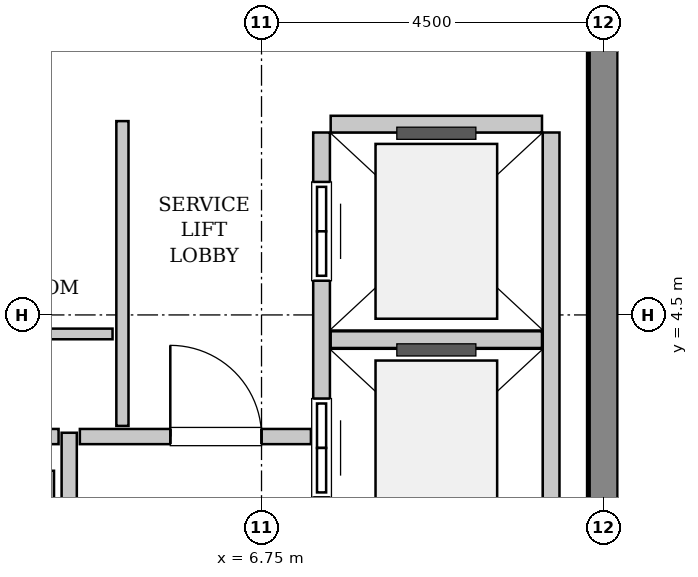
"""IFC4 building model, lengths in metres.
Left out: names, types, materials, properties, quantities, classifications, styles, units other than length and angle.
Written with IfcOpenShell. Run it as: python <this file> out.ifc"""

import sys

from ifc_helpers import new_model, si_unit, direction, frame, frame_2d, origin, place, context, subcontext, project, spatial, rectangle, extrude, source, transform, mapped, element, fill, save


model = new_model("IFC4")
c1 = context("Model", 3, precision=1e-05, world=origin(), true_north=direction((0.0, 1.0)))
c2 = subcontext(c1, "Body", "Model", "MODEL_VIEW")
j1 = project(units=[si_unit("LENGTHUNIT", "METRE"), si_unit("PLANEANGLEUNIT", "RADIAN")], contexts=[c1])
p1 = place(None, origin())
s1 = spatial("IfcSite", under=j1, at=p1, CompositionType="ELEMENT")
p2 = place(p1, origin())
s2 = spatial("IfcBuilding", under=s1, at=p2, CompositionType="ELEMENT")
p3 = place(p2, frame((0.0, 0.0, 358.6)))
s3 = spatial("IfcBuildingStorey", under=s2, at=p3, CompositionType="ELEMENT", Elevation=358.6)
m1 = source(origin(), c2, "Body", "SweptSolid", [
    extrude(rectangle(XDim=7.45, YDim=0.4, at=frame_2d((3.725, 0.0))), origin(), (0.0, 0.0, 1.0), 4.4),
])
p4 = place(p3, frame((11.25, 1.35, 0.0), z_axis=(0.0, 0.0, 1.0), x_axis=(0.0, 1.0, 0.0)))
e1 = element("IfcWall", 1, at=p4, inside=s3, PredefinedType="SHEAR", context=c2, shape_type="MappedRepresentation", body=[
    mapped(m1, transform((0.0, 0.0, 0.0), x_axis=(1.0, 0.0, 0.0), y_axis=(0.0, 1.0, 0.0), z_axis=(0.0, 0.0, 1.0), scale=1.0)),
])
m2 = source(origin(), c2, "Body", "SweptSolid", [
    extrude(rectangle(XDim=5.45, YDim=0.22, at=frame_2d((2.725, 0.0))), origin(), (0.0, 0.0, 1.0), 4.085),
])
p5 = place(p3, frame((7.54, 6.9, 0.0), z_axis=(0.0, 0.0, 1.0), x_axis=(0.0, -1.0, 0.0)))
e2 = element("IfcWall", 2, at=p5, inside=s3, PredefinedType="SOLIDWALL", context=c2, shape_type="MappedRepresentation", body=[
    mapped(m2, transform((0.0, 0.0, 0.0), x_axis=(1.0, 0.0, 0.0), y_axis=(0.0, 1.0, 0.0), z_axis=(0.0, 0.0, 1.0), scale=1.0)),
])
p6 = place(p5, frame((3.5, 0.0, 0.0)))
e3 = element("IfcOpeningElement", 3, at=p6, cuts=e2, PredefinedType="OPENING", context=c2, shape_type="SweptSolid", body=[
    extrude(rectangle(XDim=1.3, YDim=2.3, at=frame_2d((0.65, 1.15))), frame((0.0, 0.12, 0.0), z_axis=(0.0, -1.0, 0.0), x_axis=(1.0, 0.0, 0.0)), (0.0, 0.0, 1.0), 0.24),
])
p7 = place(p5, frame((0.65, 0.0, 0.0)))
e4 = element("IfcOpeningElement", 4, at=p7, cuts=e2, PredefinedType="OPENING", context=c2, shape_type="SweptSolid", body=[
    extrude(rectangle(XDim=1.3, YDim=2.3, at=frame_2d((0.65, 1.15))), frame((0.0, 0.12, 0.0), z_axis=(0.0, -1.0, 0.0), x_axis=(1.0, 0.0, 0.0)), (0.0, 0.0, 1.0), 0.24),
])
p8 = place(p3, frame((10.56, 1.45, 0.0), z_axis=(0.0, 0.0, 1.0), x_axis=(0.0, 1.0, 0.0)))
e5 = element("IfcWall", 5, at=p8, inside=s3, PredefinedType="SOLIDWALL", context=c2, shape_type="MappedRepresentation", body=[
    mapped(m2, transform((0.0, 0.0, 0.0), x_axis=(1.0, 0.0, 0.0), y_axis=(0.0, 1.0, 0.0), z_axis=(0.0, 0.0, 1.0), scale=1.0)),
])
m3 = source(origin(), c2, "Body", "SweptSolid", [
    extrude(rectangle(XDim=2.78, YDim=0.22, at=frame_2d((1.39, 0.0))), origin(), (0.0, 0.0, 1.0), 4.085),
])
for number, where, z_axis, x_axis in (
    (6, (7.66, 4.175, 0.0), (0.0, 0.0, 1.0), (1.0, 0.0, 0.0)),
    (7, (10.44, 7.01, 0.0), (0.0, 0.0, 1.0), (-1.0, 0.0, 0.0)),
):
    element("IfcWall", number, at=place(p3, frame(where, z_axis=z_axis, x_axis=x_axis)), inside=s3, PredefinedType="SOLIDWALL", context=c2, shape_type="MappedRepresentation", body=[
        mapped(m3, transform((0.0, 0.0, 0.0), x_axis=(1.0, 0.0, 0.0), y_axis=(0.0, 1.0, 0.0), z_axis=(0.0, 0.0, 1.0), scale=1.0)),
    ])
m4 = source(origin(), c2, "Body", "SweptSolid", [
    extrude(rectangle(XDim=4.9, YDim=0.22, at=frame_2d((2.45, 0.0))), origin(), (0.0, 0.0, 1.0), 4.085),
])
p9 = place(p3, frame((3.91, -2.45, 0.0), z_axis=(0.0, 0.0, 1.0), x_axis=(0.0, 1.0, 0.0)))
e8 = element("IfcWall", 8, at=p9, inside=s3, PredefinedType="SOLIDWALL", context=c2, shape_type="MappedRepresentation", body=[
    mapped(m4, transform((0.0, 0.0, 0.0), x_axis=(1.0, 0.0, 0.0), y_axis=(0.0, 1.0, 0.0), z_axis=(0.0, 0.0, 1.0), scale=1.0)),
])
m5 = source(origin(), c2, "Body", "SweptSolid", [
    extrude(rectangle(XDim=5.9, YDim=0.2, at=frame_2d((2.95, 0.0))), origin(), (0.0, 0.0, 1.0), 4.085),
])
p10 = place(p3, frame((4.22, -2.95, 0.0), z_axis=(0.0, 0.0, 1.0), x_axis=(0.0, 1.0, 0.0)))
e9 = element("IfcWall", 9, at=p10, inside=s3, PredefinedType="PARTITIONING", context=c2, shape_type="MappedRepresentation", body=[
    mapped(m5, transform((0.0, 0.0, 0.0), x_axis=(1.0, 0.0, 0.0), y_axis=(0.0, 1.0, 0.0), z_axis=(0.0, 0.0, 1.0), scale=1.0)),
])
m6 = source(origin(), c2, "Body", "SweptSolid", [
    extrude(rectangle(XDim=2.52, YDim=0.2, at=frame_2d((1.26, 0.0))), origin(), (0.0, 0.0, 1.0), 4.085),
])
p11 = place(p3, frame((1.56, 2.9, 0.0), z_axis=(0.0, 0.0, 1.0), x_axis=(1.0, 0.0, 0.0)))
e10 = element("IfcWall", 10, at=p11, inside=s3, PredefinedType="PARTITIONING", context=c2, shape_type="MappedRepresentation", body=[
    mapped(m6, transform((0.0, 0.0, 0.0), x_axis=(1.0, 0.0, 0.0), y_axis=(0.0, 1.0, 0.0), z_axis=(0.0, 0.0, 1.0), scale=1.0)),
])
m7 = source(origin(), c2, "Body", "SweptSolid", [
    extrude(rectangle(XDim=3.04, YDim=0.2, at=frame_2d((1.52, 0.0))), origin(), (0.0, 0.0, 1.0), 4.085),
])
p12 = place(p3, frame((4.36, 2.9, 0.0), z_axis=(0.0, 0.0, 1.0), x_axis=(1.0, 0.0, 0.0)))
e11 = element("IfcWall", 11, at=p12, inside=s3, PredefinedType="PARTITIONING", context=c2, shape_type="MappedRepresentation", body=[
    mapped(m7, transform((0.0, 0.0, 0.0), x_axis=(1.0, 0.0, 0.0), y_axis=(0.0, 1.0, 0.0), z_axis=(0.0, 0.0, 1.0), scale=1.0)),
])
p13 = place(p12, frame((1.19, 0.0, 0.0)))
e12 = element("IfcOpeningElement", 12, at=p13, cuts=e11, PredefinedType="OPENING", context=c2, shape_type="SweptSolid", body=[
    extrude(rectangle(XDim=1.2, YDim=2.15, at=frame_2d((0.6, 1.075))), frame((0.0, 0.11, 0.0), z_axis=(0.0, -1.0, 0.0), x_axis=(1.0, 0.0, 0.0)), (0.0, 0.0, 1.0), 0.22),
])
m8 = source(origin(), c2, "Body", "SweptSolid", [
    extrude(rectangle(XDim=4.01, YDim=0.16, at=frame_2d((2.005, 0.0))), origin(), (0.0, 0.0, 1.0), 4.085),
])
p14 = place(p3, frame((4.92, 3.04, 0.0), z_axis=(0.0, 0.0, 1.0), x_axis=(0.0, 1.0, 0.0)))
e13 = element("IfcWall", 13, at=p14, inside=s3, PredefinedType="PARTITIONING", context=c2, shape_type="MappedRepresentation", body=[
    mapped(m8, transform((0.0, 0.0, 0.0), x_axis=(1.0, 0.0, 0.0), y_axis=(0.0, 1.0, 0.0), z_axis=(0.0, 0.0, 1.0), scale=1.0)),
])
m9 = source(origin(), c2, "Body", "SweptSolid", [
    extrude(rectangle(XDim=3.15, YDim=0.14, at=frame_2d((1.575, 0.0))), origin(), (0.0, 0.0, 1.0), 4.085),
])
p15 = place(p3, frame((1.64, 4.25, 0.0), z_axis=(0.0, 0.0, 1.0), x_axis=(1.0, 0.0, 0.0)))
e14 = element("IfcWall", 14, at=p15, inside=s3, PredefinedType="PARTITIONING", context=c2, shape_type="MappedRepresentation", body=[
    mapped(m9, transform((0.0, 0.0, 0.0), x_axis=(1.0, 0.0, 0.0), y_axis=(0.0, 1.0, 0.0), z_axis=(0.0, 0.0, 1.0), scale=1.0)),
])
m10 = source(origin(), c2, "Body", "SweptSolid", [
    extrude(rectangle(XDim=1.3, YDim=2.3, at=frame_2d((0.65, 1.15))), frame((0.0, 0.025, 0.0), z_axis=(0.0, -1.0, 0.0), x_axis=(1.0, 0.0, 0.0)), (0.0, 0.0, 1.0), 0.05),
])
p16 = place(p6, origin())
e15 = element("IfcDoor", 15, at=p16, inside=s3, OperationType="SLIDING_TO_RIGHT", PredefinedType="DOOR", context=c2, shape_type="MappedRepresentation", body=[
    mapped(m10, transform((0.0, 0.0, 0.0), x_axis=(1.0, 0.0, 0.0), y_axis=(0.0, 1.0, 0.0), z_axis=(0.0, 0.0, 1.0), scale=1.0)),
])
fill(e3, e15)
p17 = place(p7, origin())
e16 = element("IfcDoor", 16, at=p17, inside=s3, OperationType="SLIDING_TO_RIGHT", PredefinedType="DOOR", context=c2, shape_type="MappedRepresentation", body=[
    mapped(m10, transform((0.0, 0.0, 0.0), x_axis=(1.0, 0.0, 0.0), y_axis=(0.0, 1.0, 0.0), z_axis=(0.0, 0.0, 1.0), scale=1.0)),
])
fill(e4, e16)
m11 = source(origin(), c2, "Body", "SweptSolid", [
    extrude(rectangle(XDim=1.2, YDim=2.15, at=frame_2d((0.6, 1.075))), frame((0.0, 0.025, 0.0), z_axis=(0.0, -1.0, 0.0), x_axis=(1.0, 0.0, 0.0)), (0.0, 0.0, 1.0), 0.05),
])
p18 = place(p13, origin())
e17 = element("IfcDoor", 17, at=p18, inside=s3, OperationType="SINGLE_SWING_LEFT", PredefinedType="DOOR", context=c2, shape_type="MappedRepresentation", body=[
    mapped(m11, transform((0.0, 0.0, 0.0), x_axis=(1.0, 0.0, 0.0), y_axis=(0.0, 1.0, 0.0), z_axis=(0.0, 0.0, 1.0), scale=1.0)),
])
fill(e12, e17)
save(model, sys.argv[1])
